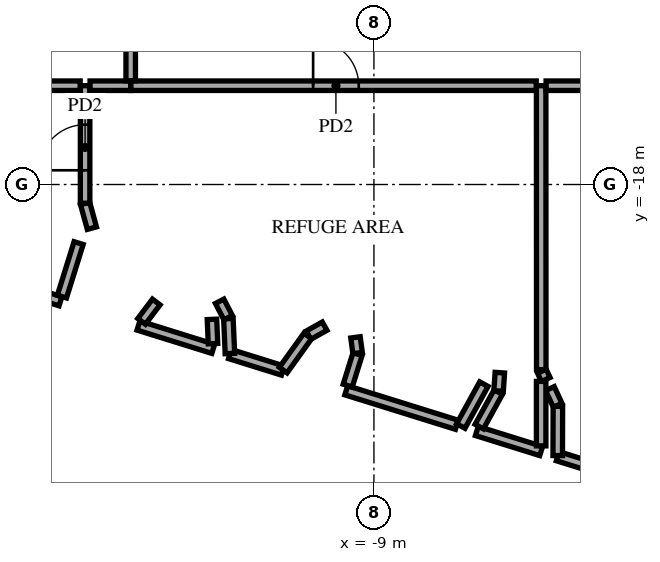
"""IFC4 building model, lengths in metres.
Left out: names, types, materials, properties, quantities, classifications, styles, units other than length and angle.
Written with IfcOpenShell. Run it as: python <this file> out.ifc"""

import sys

from ifc_helpers import new_model, si_unit, direction, frame, frame_2d, origin, place, context, subcontext, project, spatial, rectangle, extrude, element, fill, save


model = new_model("IFC4")
c1 = context("Model", 3, precision=1e-05, world=origin(), true_north=direction((0.0, 1.0)))
c2 = subcontext(c1, "Body", "Model", "MODEL_VIEW")
j1 = project(units=[si_unit("LENGTHUNIT", "METRE"), si_unit("PLANEANGLEUNIT", "RADIAN")], contexts=[c1])
p1 = place(None, origin())
s1 = spatial("IfcSite", under=j1, at=p1, CompositionType="ELEMENT")
p2 = place(p1, origin())
s2 = spatial("IfcBuilding", under=s1, at=p2, CompositionType="ELEMENT")
p3 = place(p2, frame((0.0, 0.0, 344.5)))
s3 = spatial("IfcBuildingStorey", under=s2, at=p3, CompositionType="ELEMENT", Elevation=344.5)
p4 = place(p3, frame((-4.164, -25.15, 0.0), z_axis=(0.0, 0.0, 1.0), x_axis=(0.954746698035, -0.297420144898, 0.0)))
e1 = element("IfcWall", 1, at=p4, inside=s3, PredefinedType="PARTITIONING", context=c2, shape_type="SweptSolid", body=[
    extrude(rectangle(XDim=2.7, YDim=0.25, at=frame_2d((1.35, 0.0))), origin(), (0.0, 0.0, 1.0), 5.3),
])
p5 = place(p3, frame((-4.164, -25.133, 0.0), z_axis=(0.0, 0.0, 1.0), x_axis=(0.003016577527, 0.99999545012, 0.0)))
e2 = element("IfcWall", 2, at=p5, inside=s3, PredefinedType="PARTITIONING", context=c2, shape_type="SweptSolid", body=[
    extrude(rectangle(XDim=1.295, YDim=0.25, at=frame_2d((0.647, 0.0))), origin(), (0.0, 0.0, 1.0), 5.3),
])
p6 = place(p3, frame((-6.292, -24.487, 0.0), z_axis=(0.0, 0.0, 1.0), x_axis=(0.95472472201, -0.297490680834, 0.0)))
e3 = element("IfcWall", 3, at=p6, inside=s3, PredefinedType="PARTITIONING", context=c2, shape_type="SweptSolid", body=[
    extrude(rectangle(XDim=1.773, YDim=0.25, at=frame_2d((0.886, 0.0))), origin(), (0.0, 0.0, 1.0), 5.3),
])
p7 = place(p3, frame((-6.228, -24.371, 0.0), z_axis=(0.0, 0.0, 1.0), x_axis=(0.482442640443, 0.875927564746, 0.0)))
e4 = element("IfcWall", 4, at=p7, inside=s3, PredefinedType="PARTITIONING", context=c2, shape_type="SweptSolid", body=[
    extrude(rectangle(XDim=1.037, YDim=0.25, at=frame_2d((0.519, 0.0))), origin(), (0.0, 0.0, 1.0), 5.3),
])
p8 = place(p3, frame((-9.728, -23.416, 0.0), z_axis=(0.0, 0.0, 1.0), x_axis=(0.954716292959, -0.297517730496, 0.0)))
e5 = element("IfcWall", 5, at=p8, inside=s3, PredefinedType="PARTITIONING", context=c2, shape_type="SweptSolid", body=[
    extrude(rectangle(XDim=3.048, YDim=0.25, at=frame_2d((1.524, 0.0))), origin(), (0.0, 0.0, 1.0), 5.3),
])
p9 = place(p3, frame((-4.369, -23.37, 0.0), z_axis=(0.0, 0.0, 1.0), x_axis=(0.419538351175, -0.907737611809, 0.0)))
e6 = element("IfcWall", 6, at=p9, inside=s3, PredefinedType="PARTITIONING", context=c2, shape_type="SweptSolid", body=[
    extrude(rectangle(XDim=0.484, YDim=0.25, at=frame_2d((0.242, 0.0))), origin(), (0.0, 0.0, 1.0), 5.3),
])
p10 = place(p3, frame((-5.719, -23.434, 0.0), z_axis=(0.0, 0.0, 1.0), x_axis=(0.067155745514, 0.99774250478, 0.0)))
e7 = element("IfcWall", 7, at=p10, inside=s3, PredefinedType="PARTITIONING", context=c2, shape_type="SweptSolid", body=[
    extrude(rectangle(XDim=0.483, YDim=0.25, at=frame_2d((0.242, 0.0))), origin(), (0.0, 0.0, 1.0), 5.3),
])
p11 = place(p3, frame((-9.69, -23.292, 0.0), z_axis=(0.0, 0.0, 1.0), x_axis=(0.297488902776, 0.954725276048, 0.0)))
e8 = element("IfcWall", 8, at=p11, inside=s3, PredefinedType="PARTITIONING", context=c2, shape_type="SweptSolid", body=[
    extrude(rectangle(XDim=0.867, YDim=0.25, at=frame_2d((0.433, 0.0))), origin(), (0.0, 0.0, 1.0), 5.3),
])
p12 = place(p3, frame((-4.58, -22.914, 0.0), z_axis=(0.0, 0.0, 1.0), x_axis=(0.420542791292, -0.907272704699, 0.0)))
e9 = element("IfcWall", 9, at=p12, inside=s3, PredefinedType="PARTITIONING", context=c2, shape_type="SweptSolid", body=[
    extrude(rectangle(XDim=0.24, YDim=0.25, at=frame_2d((0.12, 0.0))), origin(), (0.0, 0.0, 1.0), 5.3),
])
p13 = place(p3, frame((-6.714, -24.355, 0.0), z_axis=(0.0, 0.0, 1.0), x_axis=(0.482477192193, 0.875908533475, 0.0)))
e10 = element("IfcWall", 10, at=p13, inside=s3, PredefinedType="PARTITIONING", context=c2, shape_type="SweptSolid", body=[
    extrude(rectangle(XDim=1.259, YDim=0.25, at=frame_2d((0.629, 0.0))), origin(), (0.0, 0.0, 1.0), 5.3),
])
p14 = place(p3, frame((-12.789, -22.462, 0.0), z_axis=(0.0, 0.0, 1.0), x_axis=(0.954738594282, -0.297446157462, 0.0)))
e11 = element("IfcWall", 11, at=p14, inside=s3, PredefinedType="PARTITIONING", context=c2, shape_type="SweptSolid", body=[
    extrude(rectangle(XDim=1.459, YDim=0.25, at=frame_2d((0.73, 0.0))), origin(), (0.0, 0.0, 1.0), 5.3),
])
p15 = place(p3, frame((-4.6, -15.4, 0.0), z_axis=(0.0, 0.0, 1.0), x_axis=(0.000392105577, -0.999999923127, 0.0)))
e12 = element("IfcWall", 12, at=p15, inside=s3, PredefinedType="PARTITIONING", context=c2, shape_type="SweptSolid", body=[
    extrude(rectangle(XDim=7.472, YDim=0.25, at=frame_2d((3.736, 0.0))), origin(), (0.0, 0.0, 1.0), 4.466),
])
p16 = place(p3, frame((-12.829, -21.53, 0.0), z_axis=(0.0, 0.0, 1.0), x_axis=(0.043079480176, -0.999071648275, 0.0)))
e13 = element("IfcWall", 13, at=p16, inside=s3, PredefinedType="PARTITIONING", context=c2, shape_type="SweptSolid", body=[
    extrude(rectangle(XDim=0.918, YDim=0.25, at=frame_2d((0.459, 0.0))), origin(), (0.0, 0.0, 1.0), 5.3),
])
p17 = place(p3, frame((-9.485, -22.022, 0.0), z_axis=(0.0, 0.0, 1.0), x_axis=(0.133964477451, -0.990986134505, 0.0)))
e14 = element("IfcWall", 14, at=p17, inside=s3, PredefinedType="PARTITIONING", context=c2, shape_type="SweptSolid", body=[
    extrude(rectangle(XDim=0.417, YDim=0.25, at=frame_2d((0.208, 0.0))), origin(), (0.0, 0.0, 1.0), 5.3),
])
p18 = place(p3, frame((-15.197, -21.712, 0.0), z_axis=(0.0, 0.0, 1.0), x_axis=(0.954684165817, -0.297620804949, 0.0)))
e15 = element("IfcWall", 15, at=p18, inside=s3, PredefinedType="PARTITIONING", context=c2, shape_type="SweptSolid", body=[
    extrude(rectangle(XDim=2.062, YDim=0.25, at=frame_2d((1.031, 0.0))), origin(), (0.0, 0.0, 1.0), 5.3),
])
p19 = place(p3, frame((-11.387, -22.884, 0.0), z_axis=(0.0, 0.0, 1.0), x_axis=(0.583176927321, 0.812345167672, 0.0)))
e16 = element("IfcWall", 16, at=p19, inside=s3, PredefinedType="PARTITIONING", context=c2, shape_type="SweptSolid", body=[
    extrude(rectangle(XDim=1.107, YDim=0.25, at=frame_2d((0.553, 0.0))), origin(), (0.0, 0.0, 1.0), 5.3),
])
p20 = place(p3, frame((-10.719, -21.965, 0.0), z_axis=(0.0, 0.0, 1.0), x_axis=(0.871669877162, 0.490093486233, 0.0)))
e17 = element("IfcWall", 17, at=p20, inside=s3, PredefinedType="PARTITIONING", context=c2, shape_type="SweptSolid", body=[
    extrude(rectangle(XDim=0.484, YDim=0.25, at=frame_2d((0.242, 0.0))), origin(), (0.0, 0.0, 1.0), 5.3),
])
p21 = place(p3, frame((-15.113, -21.602, 0.0), z_axis=(0.0, 0.0, 1.0), x_axis=(0.602746629352, 0.797932641772, 0.0)))
e18 = element("IfcWall", 18, at=p21, inside=s3, PredefinedType="PARTITIONING", context=c2, shape_type="SweptSolid", body=[
    extrude(rectangle(XDim=0.639, YDim=0.25, at=frame_2d((0.32, 0.0))), origin(), (0.0, 0.0, 1.0), 5.3),
])
p22 = place(p3, frame((-13.262, -21.549, 0.0), z_axis=(0.0, 0.0, 1.0), x_axis=(0.042790598486, -0.99908406287, 0.0)))
e19 = element("IfcWall", 19, at=p22, inside=s3, PredefinedType="PARTITIONING", context=c2, shape_type="SweptSolid", body=[
    extrude(rectangle(XDim=0.639, YDim=0.25, at=frame_2d((0.319, 0.0))), origin(), (0.0, 0.0, 1.0), 5.3),
])
p23 = place(p3, frame((-13.06, -21.073, 0.0), z_axis=(0.0, 0.0, 1.0), x_axis=(0.460891733054, -0.887456370985, 0.0)))
e20 = element("IfcWall", 20, at=p23, inside=s3, PredefinedType="PARTITIONING", context=c2, shape_type="SweptSolid", body=[
    extrude(rectangle(XDim=0.484, YDim=0.25, at=frame_2d((0.242, 0.0))), origin(), (0.0, 0.0, 1.0), 5.3),
])
p24 = place(p3, frame((-18.94, -20.545, 0.0), z_axis=(0.0, 0.0, 1.0), x_axis=(0.95472472201, -0.297490680834, 0.0)))
e21 = element("IfcWall", 21, at=p24, inside=s3, PredefinedType="PARTITIONING", context=c2, shape_type="SweptSolid", body=[
    extrude(rectangle(XDim=1.773, YDim=0.25, at=frame_2d((0.886, 0.0))), origin(), (0.0, 0.0, 1.0), 5.3),
])
p25 = place(p3, frame((-17.209, -20.948, 0.0), z_axis=(0.0, 0.0, 1.0), x_axis=(0.297482665871, 0.954727219422, 0.0)))
e22 = element("IfcWall", 22, at=p25, inside=s3, PredefinedType="PARTITIONING", context=c2, shape_type="SweptSolid", body=[
    extrude(rectangle(XDim=1.474, YDim=0.25, at=frame_2d((0.737, 0.0))), origin(), (0.0, 0.0, 1.0), 5.3),
])
p26 = place(p3, frame((-16.6, -18.497, 0.0), z_axis=(0.0, 0.0, 1.0), x_axis=(0.264769743837, -0.964311662663, 0.0)))
e23 = element("IfcWall", 23, at=p26, inside=s3, PredefinedType="PARTITIONING", context=c2, shape_type="SweptSolid", body=[
    extrude(rectangle(XDim=0.675, YDim=0.25, at=frame_2d((0.337, 0.0))), origin(), (0.0, 0.0, 1.0), 5.3),
])
p27 = place(p3, frame((-16.6, -18.492, 0.0), z_axis=(0.0, 0.0, 1.0), x_axis=(0.0, 1.0, 0.0)))
e24 = element("IfcWall", 24, at=p27, inside=s3, PredefinedType="PARTITIONING", context=c2, shape_type="SweptSolid", body=[
    extrude(rectangle(XDim=3.092, YDim=0.25, at=frame_2d((1.546, 0.0))), origin(), (0.0, 0.0, 1.0), 5.3),
])
p28 = place(p27, frame((0.867, 0.0, 0.0)))
e25 = element("IfcOpeningElement", 25, at=p28, cuts=e24, PredefinedType="OPENING", context=c2, shape_type="SweptSolid", body=[
    extrude(rectangle(XDim=1.2, YDim=2.1, at=frame_2d((0.6, 1.05))), frame((0.0, 0.135, 0.0), z_axis=(0.0, -1.0, 0.0), x_axis=(1.0, 0.0, 0.0)), (0.0, 0.0, 1.0), 0.27),
])
p29 = place(p3, frame((-20.956, -15.4, 0.0), z_axis=(0.0, 0.0, 1.0), x_axis=(1.0, 0.0, 0.0)))
e26 = element("IfcWall", 26, at=p29, inside=s3, PredefinedType="PARTITIONING", context=c2, shape_type="SweptSolid", body=[
    extrude(rectangle(XDim=4.226, YDim=0.25, at=frame_2d((2.113, 0.0))), origin(), (0.0, 0.0, 1.0), 4.73),
])
p30 = place(p3, frame((-16.47, -15.4, 0.0), z_axis=(0.0, 0.0, 1.0), x_axis=(1.0, 0.0, 0.0)))
e27 = element("IfcWall", 27, at=p30, inside=s3, PredefinedType="PARTITIONING", context=c2, shape_type="SweptSolid", body=[
    extrude(rectangle(XDim=1.07, YDim=0.25, at=frame_2d((0.535, 0.0))), origin(), (0.0, 0.0, 1.0), 4.466),
])
p31 = place(p3, frame((-15.395, -15.4, 0.0), z_axis=(0.0, 0.0, 1.0), x_axis=(1.0, 0.0, 0.0)))
e28 = element("IfcWall", 28, at=p31, inside=s3, PredefinedType="PARTITIONING", context=c2, shape_type="SweptSolid", body=[
    extrude(rectangle(XDim=10.665, YDim=0.25, at=frame_2d((5.333, 0.0))), origin(), (0.0, 0.0, 1.0), 5.3),
])
p32 = place(p31, frame((4.795, 0.0, 0.0)))
e29 = element("IfcOpeningElement", 29, at=p32, cuts=e28, PredefinedType="OPENING", context=c2, shape_type="SweptSolid", body=[
    extrude(rectangle(XDim=1.2, YDim=2.1, at=frame_2d((0.6, 1.05))), frame((0.0, 0.135, 0.0), z_axis=(0.0, -1.0, 0.0), x_axis=(1.0, 0.0, 0.0)), (0.0, 0.0, 1.0), 0.27),
])
p33 = place(p3, frame((-4.6, -24.878, 0.0), z_axis=(0.0, 0.0, 1.0), x_axis=(0.0, 1.0, 0.0)))
e30 = element("IfcWall", 30, at=p33, inside=s3, PredefinedType="PARTITIONING", context=c2, shape_type="SweptSolid", body=[
    extrude(rectangle(XDim=1.697, YDim=0.25, at=frame_2d((0.849, 0.0))), origin(), (0.0, 0.0, 1.0), 5.3),
])
p34 = place(p3, frame((-4.47, -15.4, 0.0), z_axis=(0.0, 0.0, 1.0), x_axis=(1.0, 0.0, 0.0)))
e31 = element("IfcWall", 31, at=p34, inside=s3, PredefinedType="PARTITIONING", context=c2, shape_type="SweptSolid", body=[
    extrude(rectangle(XDim=9.74, YDim=0.25, at=frame_2d((4.87, 0.0))), origin(), (0.0, 0.0, 1.0), 5.3),
])
p35 = place(p34, frame((4.27, 0.0, 0.0)))
e32 = element("IfcOpeningElement", 32, at=p35, cuts=e31, PredefinedType="OPENING", context=c2, shape_type="SweptSolid", body=[
    extrude(rectangle(XDim=1.2, YDim=2.1, at=frame_2d((0.6, 1.05))), frame((0.0, 0.135, 0.0), z_axis=(0.0, -1.0, 0.0), x_axis=(1.0, 0.0, 0.0)), (0.0, 0.0, 1.0), 0.27),
])
p36 = place(p3, frame((-15.4, -15.27, 0.0), z_axis=(0.0, 0.0, 1.0), x_axis=(0.0, 1.0, 0.0)))
e33 = element("IfcWall", 33, at=p36, inside=s3, PredefinedType="PARTITIONING", context=c2, shape_type="SweptSolid", body=[
    extrude(rectangle(XDim=3.186, YDim=0.25, at=frame_2d((1.593, 0.0))), origin(), (0.0, 0.0, 1.0), 4.56),
])
p37 = place(p3, frame((-26.706, -24.687, 0.0), z_axis=(0.0, 0.0, 1.0), x_axis=(0.978147216992, -0.207913496171, 0.0)))
e34 = element("IfcWall", 34, at=p37, inside=s3, PredefinedType="STANDARD", context=c2, shape_type="SweptSolid", body=[
    extrude(rectangle(XDim=41.979, YDim=0.6, at=frame_2d((20.99, 0.0))), origin(), (0.0, 0.0, 1.0), 5.3),
])
p38 = place(p37, frame((1.232, 0.0, 0.6)))
e35 = element("IfcOpeningElement", 35, at=p38, cuts=e34, PredefinedType="OPENING", context=c2, shape_type="SweptSolid", body=[
    extrude(rectangle(XDim=2.2, YDim=4.25, at=frame_2d((1.1, 2.125))), frame((0.0, 0.31, 0.0), z_axis=(0.0, -1.0, 0.0), x_axis=(1.0, 0.0, 0.0)), (0.0, 0.0, 1.0), 0.62),
])
p39 = place(p37, frame((5.896, 0.0, 0.6)))
e36 = element("IfcOpeningElement", 36, at=p39, cuts=e34, PredefinedType="OPENING", context=c2, shape_type="SweptSolid", body=[
    extrude(rectangle(XDim=2.2, YDim=4.25, at=frame_2d((1.1, 2.125))), frame((0.0, 0.31, 0.0), z_axis=(0.0, -1.0, 0.0), x_axis=(1.0, 0.0, 0.0)), (0.0, 0.0, 1.0), 0.62),
])
p40 = place(p37, frame((10.561, 0.0, 0.6)))
e37 = element("IfcOpeningElement", 37, at=p40, cuts=e34, PredefinedType="OPENING", context=c2, shape_type="SweptSolid", body=[
    extrude(rectangle(XDim=2.2, YDim=4.25, at=frame_2d((1.1, 2.125))), frame((0.0, 0.31, 0.0), z_axis=(0.0, -1.0, 0.0), x_axis=(1.0, 0.0, 0.0)), (0.0, 0.0, 1.0), 0.62),
])
p41 = place(p37, frame((15.225, 0.0, 0.6)))
e38 = element("IfcOpeningElement", 38, at=p41, cuts=e34, PredefinedType="OPENING", context=c2, shape_type="SweptSolid", body=[
    extrude(rectangle(XDim=2.2, YDim=4.25, at=frame_2d((1.1, 2.125))), frame((0.0, 0.31, 0.0), z_axis=(0.0, -1.0, 0.0), x_axis=(1.0, 0.0, 0.0)), (0.0, 0.0, 1.0), 0.62),
])
p42 = place(p37, frame((19.89, 0.0, 0.6)))
e39 = element("IfcOpeningElement", 39, at=p42, cuts=e34, PredefinedType="OPENING", context=c2, shape_type="SweptSolid", body=[
    extrude(rectangle(XDim=2.2, YDim=4.25, at=frame_2d((1.1, 2.125))), frame((0.0, 0.31, 0.0), z_axis=(0.0, -1.0, 0.0), x_axis=(1.0, 0.0, 0.0)), (0.0, 0.0, 1.0), 0.62),
])
p43 = place(p37, frame((24.554, 0.0, 0.6)))
e40 = element("IfcOpeningElement", 40, at=p43, cuts=e34, PredefinedType="OPENING", context=c2, shape_type="SweptSolid", body=[
    extrude(rectangle(XDim=2.2, YDim=4.25, at=frame_2d((1.1, 2.125))), frame((0.0, 0.31, 0.0), z_axis=(0.0, -1.0, 0.0), x_axis=(1.0, 0.0, 0.0)), (0.0, 0.0, 1.0), 0.62),
])
p44 = place(p37, frame((29.218, 0.0, 0.6)))
e41 = element("IfcOpeningElement", 41, at=p44, cuts=e34, PredefinedType="OPENING", context=c2, shape_type="SweptSolid", body=[
    extrude(rectangle(XDim=2.2, YDim=4.25, at=frame_2d((1.1, 2.125))), frame((0.0, 0.31, 0.0), z_axis=(0.0, -1.0, 0.0), x_axis=(1.0, 0.0, 0.0)), (0.0, 0.0, 1.0), 0.62),
])
p45 = place(p37, frame((33.883, 0.0, 0.6)))
e42 = element("IfcOpeningElement", 42, at=p45, cuts=e34, PredefinedType="OPENING", context=c2, shape_type="SweptSolid", body=[
    extrude(rectangle(XDim=2.2, YDim=4.25, at=frame_2d((1.1, 2.125))), frame((0.0, 0.31, 0.0), z_axis=(0.0, -1.0, 0.0), x_axis=(1.0, 0.0, 0.0)), (0.0, 0.0, 1.0), 0.62),
])
p46 = place(p37, frame((38.547, 0.0, 0.6)))
e43 = element("IfcOpeningElement", 43, at=p46, cuts=e34, PredefinedType="OPENING", context=c2, shape_type="SweptSolid", body=[
    extrude(rectangle(XDim=2.2, YDim=4.25, at=frame_2d((1.1, 2.125))), frame((0.0, 0.31, 0.0), z_axis=(0.0, -1.0, 0.0), x_axis=(1.0, 0.0, 0.0)), (0.0, 0.0, 1.0), 0.62),
])
p47 = place(p32, origin())
e44 = element("IfcDoor", 44, at=p47, inside=s3, OperationType="SINGLE_SWING_LEFT", PredefinedType="DOOR", context=c2, shape_type="SweptSolid", body=[
    extrude(rectangle(XDim=1.2, YDim=2.1, at=frame_2d((0.6, 1.05))), frame((0.0, 0.025, 0.0), z_axis=(0.0, -1.0, 0.0), x_axis=(1.0, 0.0, 0.0)), (0.0, 0.0, 1.0), 0.05),
])
fill(e29, e44)
p48 = place(p28, origin())
e45 = element("IfcDoor", 45, at=p48, inside=s3, OperationType="SINGLE_SWING_RIGHT", PredefinedType="DOOR", context=c2, shape_type="SweptSolid", body=[
    extrude(rectangle(XDim=1.2, YDim=2.1, at=frame_2d((0.6, 1.05))), frame((0.0, 0.025, 0.0), z_axis=(0.0, -1.0, 0.0), x_axis=(1.0, 0.0, 0.0)), (0.0, 0.0, 1.0), 0.05),
])
fill(e25, e45)
save(model, sys.argv[1])
